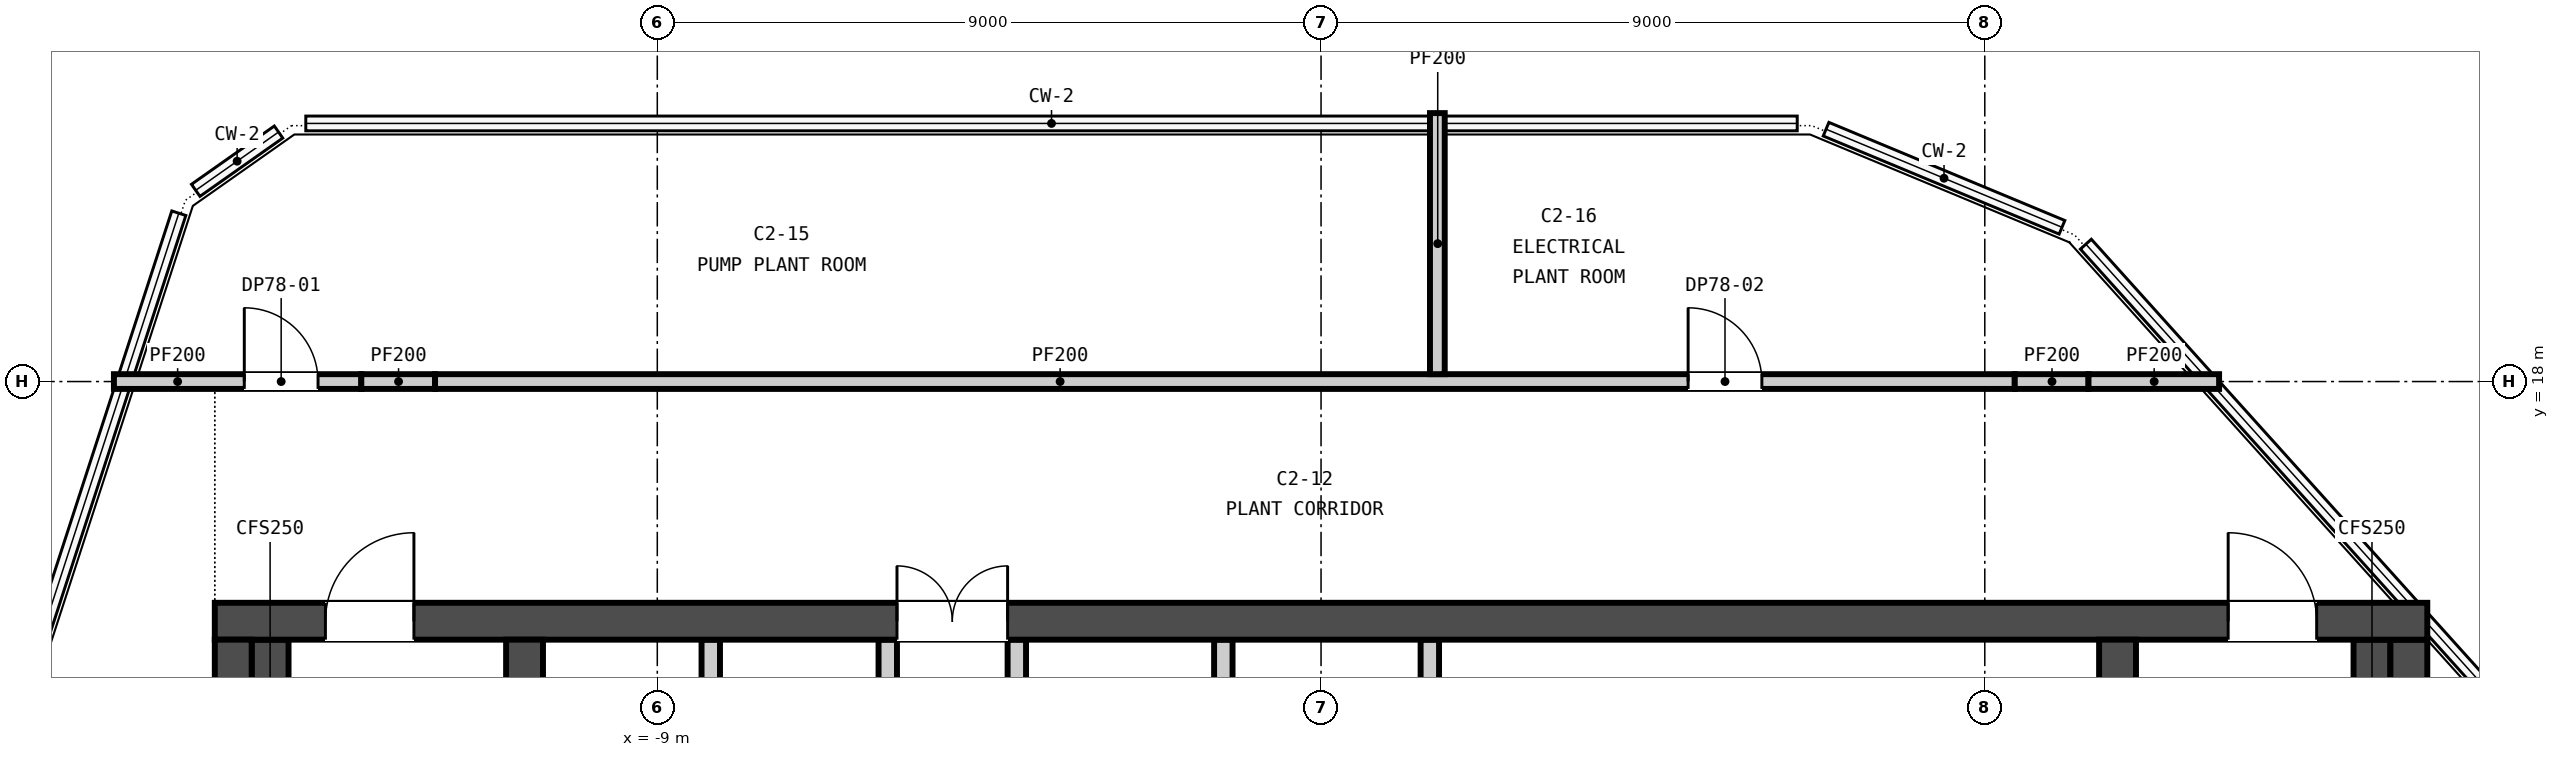
"""IFC4 building model, lengths in metres.
Left out: names, types, materials, properties, quantities, classifications, styles, units other than length and angle.
Written with IfcOpenShell. Run it as: python <this file> out.ifc"""

import sys

from ifc_helpers import new_model, si_unit, direction, frame, frame_2d, origin, place, context, subcontext, project, spatial, rectangle, extrude, element, fill, save


model = new_model("IFC4")
c1 = context("Model", 3, precision=1e-05, world=origin(), true_north=direction((0.0, 1.0)))
c2 = subcontext(c1, "Body", "Model", "MODEL_VIEW")
j1 = project(units=[si_unit("LENGTHUNIT", "METRE"), si_unit("PLANEANGLEUNIT", "RADIAN")], contexts=[c1])
p1 = place(None, origin())
s1 = spatial("IfcSite", under=j1, at=p1, CompositionType="ELEMENT")
p2 = place(p1, origin())
s2 = spatial("IfcBuilding", under=s1, at=p2, CompositionType="ELEMENT")
p3 = place(p2, frame((0.0, 0.0, 306.1)))
s3 = spatial("IfcBuildingStorey", under=s2, at=p3, CompositionType="ELEMENT", Elevation=306.1)
p4 = place(p3, frame((-15.0, 14.75, -0.25), z_axis=(0.0, 0.0, 1.0), x_axis=(1.0, 0.0, 0.0)))
e1 = element("IfcWall", 1, at=p4, inside=s3, PredefinedType="SOLIDWALL", context=c2, shape_type="SweptSolid", body=[
    extrude(rectangle(XDim=30.0, YDim=0.5, at=frame_2d((15.0, 0.0))), origin(), (0.0, 0.0, 1.0), 5.0),
])
p5 = place(p4, frame((1.5, 0.0, 0.25)))
e2 = element("IfcOpeningElement", 2, at=p5, cuts=e1, PredefinedType="OPENING", context=c2, shape_type="SweptSolid", body=[
    extrude(rectangle(XDim=1.2, YDim=2.1, at=frame_2d((0.6, 1.05))), frame((0.0, 0.26, 0.0), z_axis=(0.0, -1.0, 0.0), x_axis=(1.0, 0.0, 0.0)), (0.0, 0.0, 1.0), 0.52),
])
p6 = place(p4, frame((27.3, 0.0, 0.25)))
e3 = element("IfcOpeningElement", 3, at=p6, cuts=e1, PredefinedType="OPENING", context=c2, shape_type="SweptSolid", body=[
    extrude(rectangle(XDim=1.2, YDim=2.1, at=frame_2d((0.6, 1.05))), frame((0.0, 0.26, 0.0), z_axis=(0.0, -1.0, 0.0), x_axis=(1.0, 0.0, 0.0)), (0.0, 0.0, 1.0), 0.52),
])
p7 = place(p4, frame((9.25, 0.0, 0.25)))
e4 = element("IfcOpeningElement", 4, at=p7, cuts=e1, PredefinedType="OPENING", context=c2, shape_type="SweptSolid", body=[
    extrude(rectangle(XDim=1.5, YDim=2.1, at=frame_2d((0.75, 1.05))), frame((0.0, 0.26, 0.0), z_axis=(0.0, -1.0, 0.0), x_axis=(1.0, 0.0, 0.0)), (0.0, 0.0, 1.0), 0.52),
])
for number, where, z_axis, x_axis in (
    (5, (-14.75, 0.5, -0.25), (0.0, 0.0, 1.0), (0.0, 1.0, 0.0)),
    (6, (14.75, 0.5, -0.25), (0.0, 0.0, 1.0), (0.0, 1.0, 0.0)),
    (7, (-10.8, 0.5, -0.25), (0.0, 0.0, 1.0), (0.0, 1.0, 0.0)),
    (8, (10.8, 0.5, -0.25), (0.0, 0.0, 1.0), (0.0, 1.0, 0.0)),
):
    element("IfcWall", number, at=place(p3, frame(where, z_axis=z_axis, x_axis=x_axis)), inside=s3, PredefinedType="SOLIDWALL", context=c2, shape_type="SweptSolid", body=[
        extrude(rectangle(XDim=14.0, YDim=0.5, at=frame_2d((7.0, 0.0))), origin(), (0.0, 0.0, 1.0), 5.0),
    ])
for number, where, z_axis, x_axis in (
    (9, (-14.25, 0.5, 0.0), (0.0, 0.0, 1.0), (0.0, 1.0, 0.0)),
    (10, (14.25, 0.5, 0.0), (0.0, 0.0, 1.0), (0.0, 1.0, 0.0)),
):
    element("IfcWall", number, at=place(p3, frame(where, z_axis=z_axis, x_axis=x_axis)), inside=s3, PredefinedType="SOLIDWALL", context=c2, shape_type="SweptSolid", body=[
        extrude(rectangle(XDim=14.0, YDim=0.5, at=frame_2d((7.0, 0.0))), origin(), (0.0, 0.0, 1.0), 4.75),
    ])
for number, where, z_axis, x_axis in (
    (11, (-8.275, 11.3, 0.0), (0.0, 0.0, 1.0), (0.0, 1.0, 0.0)),
    (12, (-5.875, 11.3, 0.0), (0.0, 0.0, 1.0), (0.0, 1.0, 0.0)),
    (13, (-4.125, 11.3, 0.0), (0.0, 0.0, 1.0), (0.0, 1.0, 0.0)),
    (14, (-1.325, 11.3, 0.0), (0.0, 0.0, 1.0), (0.0, 1.0, 0.0)),
    (15, (1.475, 11.3, 0.0), (0.0, 0.0, 1.0), (0.0, 1.0, 0.0)),
):
    element("IfcWall", number, at=place(p3, frame(where, z_axis=z_axis, x_axis=x_axis)), inside=s3, PredefinedType="PARTITIONING", context=c2, shape_type="SweptSolid", body=[
        extrude(rectangle(XDim=3.2, YDim=0.25, at=frame_2d((1.6, 0.0))), origin(), (0.0, 0.0, 1.0), 4.75),
    ])
p8 = place(p3, frame((-16.368, 18.0, 0.0), z_axis=(0.0, 0.0, 1.0), x_axis=(1.0, 0.0, 0.0)))
e16 = element("IfcWall", 16, at=p8, inside=s3, PredefinedType="PARTITIONING", context=c2, shape_type="SweptSolid", body=[
    extrude(rectangle(XDim=3.354, YDim=0.2, at=frame_2d((1.677, 0.0))), origin(), (0.0, 0.0, 1.0), 4.75),
])
p9 = place(p8, frame((1.768, 0.0, 0.0)))
e17 = element("IfcOpeningElement", 17, at=p9, cuts=e16, PredefinedType="OPENING", context=c2, shape_type="SweptSolid", body=[
    extrude(rectangle(XDim=1.0, YDim=2.1, at=frame_2d((0.5, 1.05))), frame((0.0, 0.11, 0.0), z_axis=(0.0, -1.0, 0.0), x_axis=(1.0, 0.0, 0.0)), (0.0, 0.0, 1.0), 0.22),
])
p10 = place(p3, frame((-13.013, 18.0, 0.0), z_axis=(0.0, 0.0, 1.0), x_axis=(1.0, 0.0, 0.0)))
e18 = element("IfcWall", 18, at=p10, inside=s3, PredefinedType="PARTITIONING", context=c2, shape_type="SweptSolid", body=[
    extrude(rectangle(XDim=1.0, YDim=0.2, at=frame_2d((0.5, 0.0))), origin(), (0.0, 0.0, 1.0), 4.15),
])
p11 = place(p3, frame((-12.013, 18.0, 0.0), z_axis=(0.0, 0.0, 1.0), x_axis=(1.0, 0.0, 0.0)))
e19 = element("IfcWall", 19, at=p11, inside=s3, PredefinedType="PARTITIONING", context=c2, shape_type="SweptSolid", body=[
    extrude(rectangle(XDim=21.42, YDim=0.2, at=frame_2d((10.71, 0.0))), origin(), (0.0, 0.0, 1.0), 4.75),
])
p12 = place(p11, frame((16.991, 0.0, 0.0)))
e20 = element("IfcOpeningElement", 20, at=p12, cuts=e19, PredefinedType="OPENING", context=c2, shape_type="SweptSolid", body=[
    extrude(rectangle(XDim=1.0, YDim=2.1, at=frame_2d((0.5, 1.05))), frame((0.0, 0.11, 0.0), z_axis=(0.0, -1.0, 0.0), x_axis=(1.0, 0.0, 0.0)), (0.0, 0.0, 1.0), 0.22),
])
p13 = place(p3, frame((9.406, 18.0, 0.0), z_axis=(0.0, 0.0, 1.0), x_axis=(1.0, 0.0, 0.0)))
e21 = element("IfcWall", 21, at=p13, inside=s3, PredefinedType="PARTITIONING", context=c2, shape_type="SweptSolid", body=[
    extrude(rectangle(XDim=1.0, YDim=0.2, at=frame_2d((0.5, 0.0))), origin(), (0.0, 0.0, 1.0), 4.226),
])
p14 = place(p3, frame((10.406, 18.0, 0.0), z_axis=(0.0, 0.0, 1.0), x_axis=(1.0, 0.0, 0.0)))
e22 = element("IfcWall", 22, at=p14, inside=s3, PredefinedType="PARTITIONING", context=c2, shape_type="SweptSolid", body=[
    extrude(rectangle(XDim=1.771, YDim=0.2, at=frame_2d((0.885, 0.0))), origin(), (0.0, 0.0, 1.0), 4.75),
])
p15 = place(p3, frame((1.577, 18.1, 0.0), z_axis=(0.0, 0.0, 1.0), x_axis=(0.0, 1.0, 0.0)))
e23 = element("IfcWall", 23, at=p15, inside=s3, PredefinedType="PARTITIONING", context=c2, shape_type="SweptSolid", body=[
    extrude(rectangle(XDim=3.54, YDim=0.2, at=frame_2d((1.77, 0.0))), origin(), (0.0, 0.0, 1.0), 4.75),
])
p16 = place(p5, origin())
e24 = element("IfcDoor", 24, at=p16, inside=s3, OperationType="SINGLE_SWING_RIGHT", PredefinedType="DOOR", context=c2, shape_type="SweptSolid", body=[
    extrude(rectangle(XDim=1.2, YDim=2.1, at=frame_2d((0.6, 1.05))), frame((0.0, 0.025, 0.0), z_axis=(0.0, -1.0, 0.0), x_axis=(1.0, 0.0, 0.0)), (0.0, 0.0, 1.0), 0.05),
])
fill(e2, e24)
p17 = place(p6, origin())
e25 = element("IfcDoor", 25, at=p17, inside=s3, OperationType="SINGLE_SWING_LEFT", PredefinedType="DOOR", context=c2, shape_type="SweptSolid", body=[
    extrude(rectangle(XDim=1.2, YDim=2.1, at=frame_2d((0.6, 1.05))), frame((0.0, 0.025, 0.0), z_axis=(0.0, -1.0, 0.0), x_axis=(1.0, 0.0, 0.0)), (0.0, 0.0, 1.0), 0.05),
])
fill(e3, e25)
p18 = place(p7, origin())
e26 = element("IfcDoor", 26, at=p18, inside=s3, OperationType="DOUBLE_DOOR_SINGLE_SWING", PredefinedType="DOOR", context=c2, shape_type="SweptSolid", body=[
    extrude(rectangle(XDim=1.5, YDim=2.1, at=frame_2d((0.75, 1.05))), frame((0.0, 0.025, 0.0), z_axis=(0.0, -1.0, 0.0), x_axis=(1.0, 0.0, 0.0)), (0.0, 0.0, 1.0), 0.05),
])
fill(e4, e26)
p19 = place(p9, origin())
e27 = element("IfcDoor", 27, at=p19, inside=s3, OperationType="SINGLE_SWING_LEFT", PredefinedType="DOOR", context=c2, shape_type="SweptSolid", body=[
    extrude(rectangle(XDim=1.0, YDim=2.1, at=frame_2d((0.5, 1.05))), frame((0.0, 0.025, 0.0), z_axis=(0.0, -1.0, 0.0), x_axis=(1.0, 0.0, 0.0)), (0.0, 0.0, 1.0), 0.05),
])
fill(e17, e27)
p20 = place(p12, origin())
e28 = element("IfcDoor", 28, at=p20, inside=s3, OperationType="SINGLE_SWING_LEFT", PredefinedType="DOOR", context=c2, shape_type="SweptSolid", body=[
    extrude(rectangle(XDim=1.0, YDim=2.1, at=frame_2d((0.5, 1.05))), frame((0.0, 0.025, 0.0), z_axis=(0.0, -1.0, 0.0), x_axis=(1.0, 0.0, 0.0)), (0.0, 0.0, 1.0), 0.05),
])
fill(e20, e28)
save(model, sys.argv[1])
